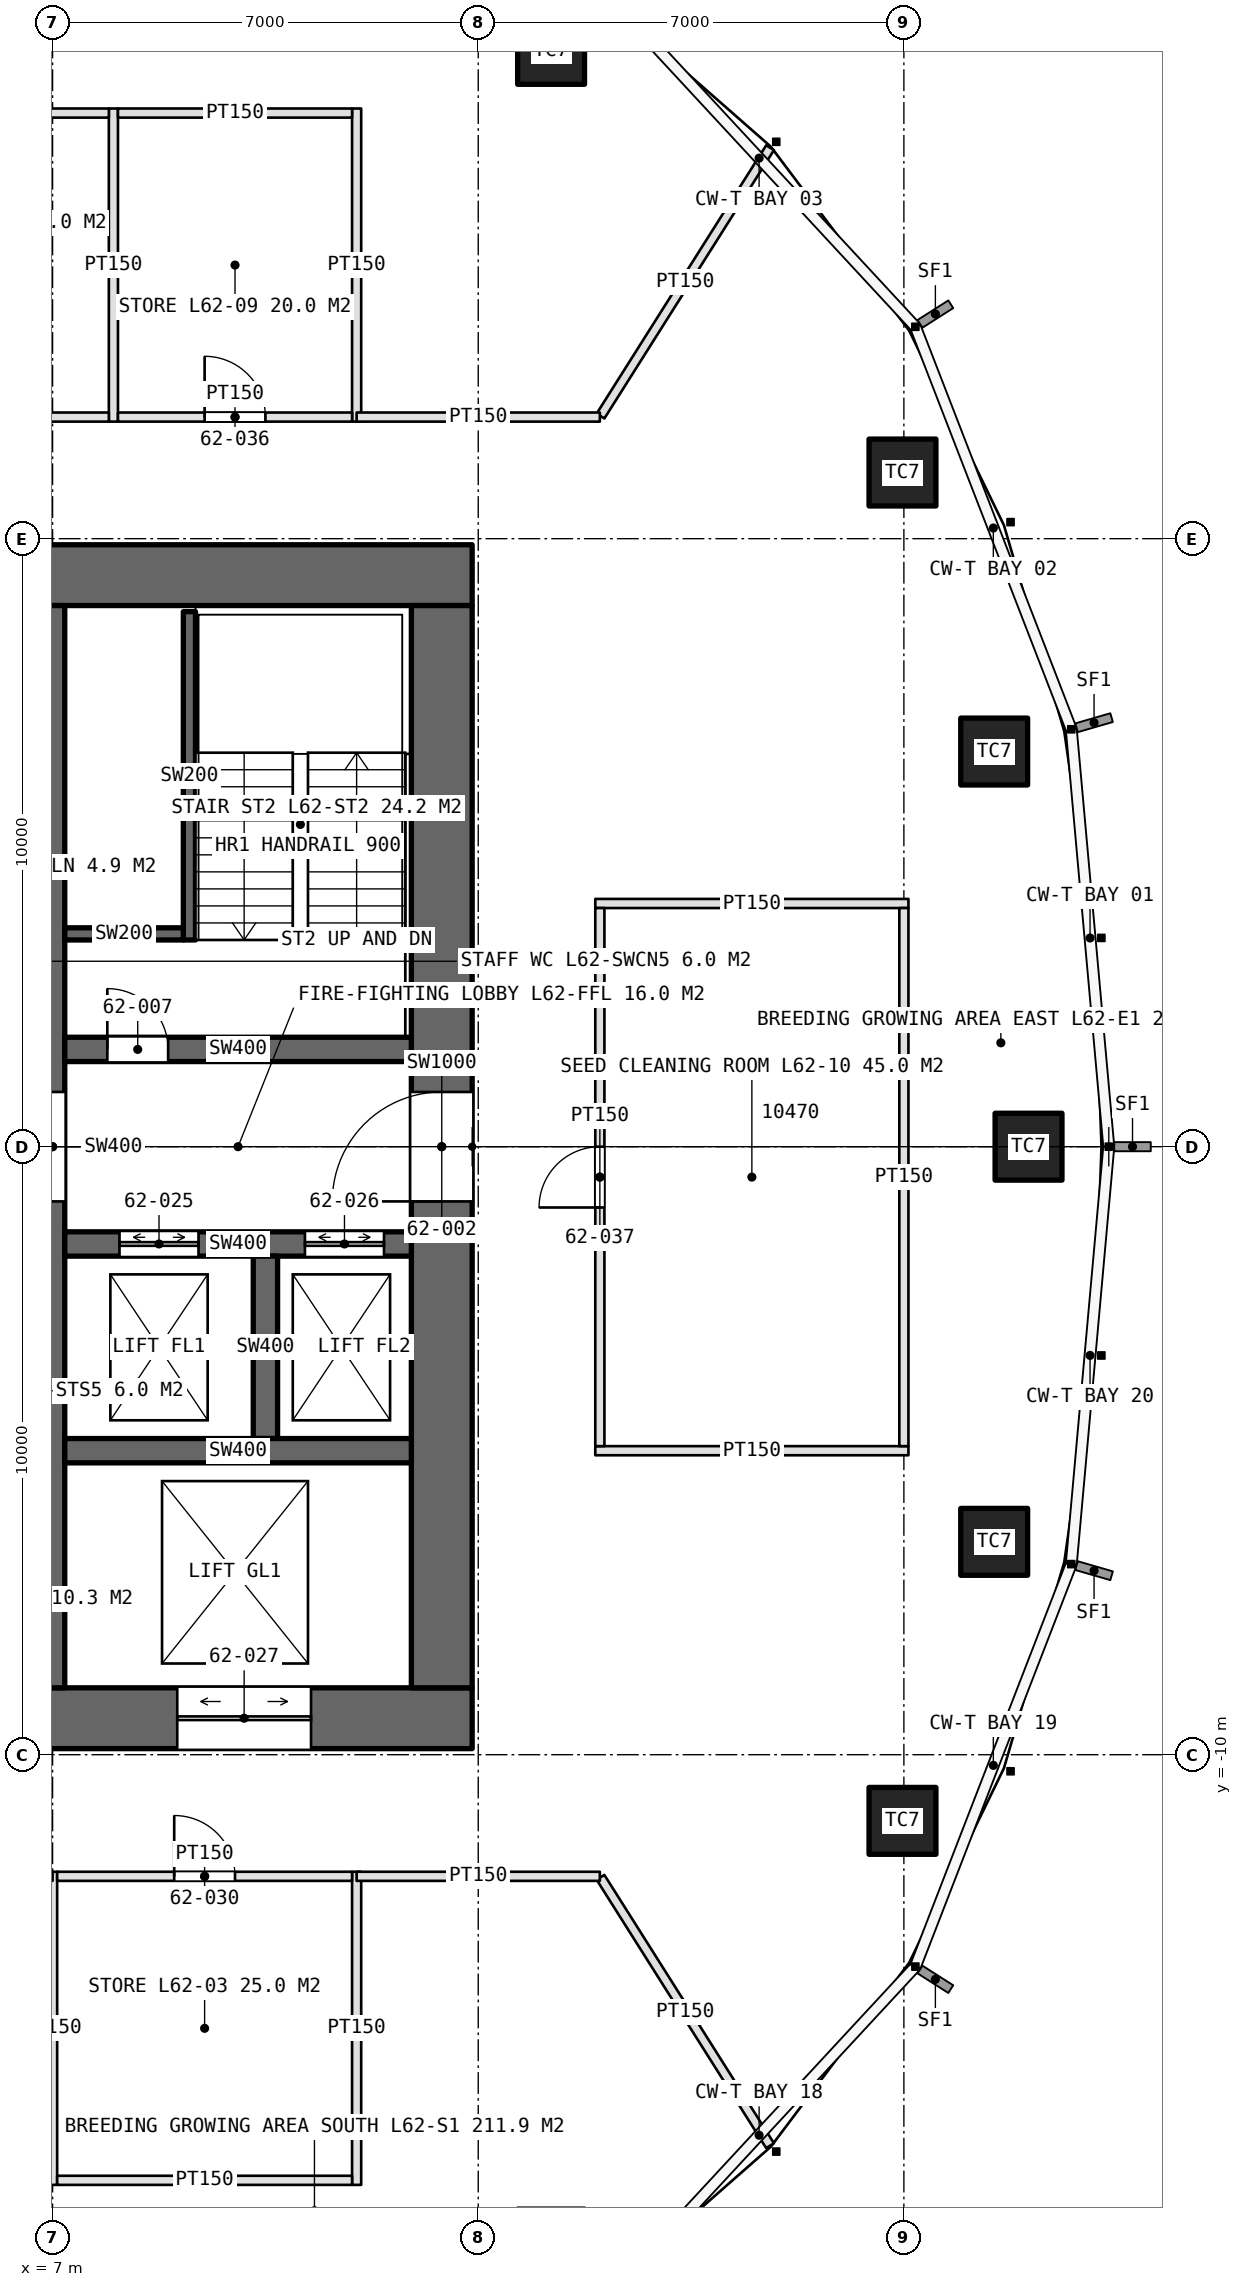
"""IFC4 building model, lengths in metres.
Left out: names, types, materials, properties, quantities, classifications, styles, units other than length and angle.
Written with IfcOpenShell. Run it as: python <this file> out.ifc"""

import sys

from ifc_helpers import new_model, si_unit, direction, frame, frame_2d, origin, origin_2d, place, context, subcontext, project, spatial, rectangle, extrude, element, fill, save


model = new_model("IFC4")
c1 = context("Model", 3, precision=1e-05, world=origin(), true_north=direction((0.0, 1.0)))
c2 = subcontext(c1, "Body", "Model", "MODEL_VIEW")
j1 = project(units=[si_unit("LENGTHUNIT", "METRE"), si_unit("PLANEANGLEUNIT", "RADIAN")], contexts=[c1])
p1 = place(None, origin())
s1 = spatial("IfcSite", under=j1, at=p1, CompositionType="ELEMENT")
p2 = place(p1, origin())
s2 = spatial("IfcBuilding", under=s1, at=p2, CompositionType="ELEMENT")
p3 = place(p2, frame((0.0, 0.0, 279.6)))
s3 = spatial("IfcBuildingStorey", under=s2, at=p3, CompositionType="ELEMENT", Elevation=279.6)
p4 = place(p3, frame((-13.9, -9.4, 0.0), z_axis=(0.0, 0.0, 1.0), x_axis=(1.0, 0.0, 0.0)))
e1 = element("IfcWall", 1, at=p4, inside=s3, PredefinedType="SHEAR", context=c2, shape_type="SweptSolid", body=[
    extrude(rectangle(XDim=27.8, YDim=1.0, at=frame_2d((13.9, 0.0))), origin(), (0.0, 0.0, 1.0), 4.2),
])
p5 = place(p4, frame((22.95, 0.0, 0.0)))
e2 = element("IfcOpeningElement", 2, at=p5, cuts=e1, PredefinedType="OPENING", context=c2, shape_type="SweptSolid", body=[
    extrude(rectangle(XDim=2.2, YDim=2.7, at=frame_2d((1.1, 1.35))), frame((0.0, 0.51, 0.0), z_axis=(0.0, -1.0, 0.0), x_axis=(1.0, 0.0, 0.0)), (0.0, 0.0, 1.0), 1.02),
])
p6 = place(p3, frame((13.9, 9.4, 0.0), z_axis=(0.0, 0.0, 1.0), x_axis=(-1.0, 0.0, 0.0)))
e3 = element("IfcWall", 3, at=p6, inside=s3, PredefinedType="SHEAR", context=c2, shape_type="SweptSolid", body=[
    extrude(rectangle(XDim=27.8, YDim=1.0, at=frame_2d((13.9, 0.0))), origin(), (0.0, 0.0, 1.0), 4.2),
])
p7 = place(p6, frame((23.9, 0.0, 0.0)))
e4 = element("IfcOpeningElement", 4, at=p7, cuts=e3, PredefinedType="OPENING", context=c2, shape_type="SweptSolid", body=[
    extrude(rectangle(XDim=1.0, YDim=2.4, at=frame_2d((0.5, 1.2))), frame((0.0, 0.51, 0.0), z_axis=(0.0, -1.0, 0.0), x_axis=(1.0, 0.0, 0.0)), (0.0, 0.0, 1.0), 1.02),
])
p8 = place(p6, frame((13.0, 0.0, 0.0)))
e5 = element("IfcOpeningElement", 5, at=p8, cuts=e3, PredefinedType="OPENING", context=c2, shape_type="SweptSolid", body=[
    extrude(rectangle(XDim=1.8, YDim=2.4, at=frame_2d((0.9, 1.2))), frame((0.0, 0.51, 0.0), z_axis=(0.0, -1.0, 0.0), x_axis=(1.0, 0.0, 0.0)), (0.0, 0.0, 1.0), 1.02),
])
p9 = place(p3, frame((13.4, -8.9, 0.0), z_axis=(0.0, 0.0, 1.0), x_axis=(0.0, 1.0, 0.0)))
e6 = element("IfcWall", 6, at=p9, inside=s3, PredefinedType="SHEAR", context=c2, shape_type="SweptSolid", body=[
    extrude(rectangle(XDim=17.8, YDim=1.0, at=frame_2d((8.9, 0.0))), origin(), (0.0, 0.0, 1.0), 4.2),
])
p10 = place(p9, frame((8.0, 0.0, 0.0)))
e7 = element("IfcOpeningElement", 7, at=p10, cuts=e6, PredefinedType="OPENING", context=c2, shape_type="SweptSolid", body=[
    extrude(rectangle(XDim=1.8, YDim=2.4, at=frame_2d((0.9, 1.2))), frame((0.0, 0.51, 0.0), z_axis=(0.0, -1.0, 0.0), x_axis=(1.0, 0.0, 0.0)), (0.0, 0.0, 1.0), 1.02),
])
p11 = place(p3, frame((7.0, -8.9, 0.0), z_axis=(0.0, 0.0, 1.0), x_axis=(0.0, 1.0, 0.0)))
e8 = element("IfcWall", 8, at=p11, inside=s3, PredefinedType="SHEAR", context=c2, shape_type="SweptSolid", body=[
    extrude(rectangle(XDim=17.8, YDim=0.4, at=frame_2d((8.9, 0.0))), origin(), (0.0, 0.0, 1.0), 4.2),
])
p12 = place(p11, frame((8.0, 0.0, 0.0)))
e9 = element("IfcOpeningElement", 9, at=p12, cuts=e8, PredefinedType="OPENING", context=c2, shape_type="SweptSolid", body=[
    extrude(rectangle(XDim=1.8, YDim=2.4, at=frame_2d((0.9, 1.2))), frame((0.0, 0.21, 0.0), z_axis=(0.0, -1.0, 0.0), x_axis=(1.0, 0.0, 0.0)), (0.0, 0.0, 1.0), 0.42),
])
p13 = place(p3, frame((7.2, 1.6, 0.0), z_axis=(0.0, 0.0, 1.0), x_axis=(1.0, 0.0, 0.0)))
e10 = element("IfcWall", 10, at=p13, inside=s3, PredefinedType="SHEAR", context=c2, shape_type="SweptSolid", body=[
    extrude(rectangle(XDim=5.7, YDim=0.4, at=frame_2d((2.85, 0.0))), origin(), (0.0, 0.0, 1.0), 4.2),
])
p14 = place(p13, frame((0.7, 0.0, 0.0)))
e11 = element("IfcOpeningElement", 11, at=p14, cuts=e10, PredefinedType="OPENING", context=c2, shape_type="SweptSolid", body=[
    extrude(rectangle(XDim=1.0, YDim=2.4, at=frame_2d((0.5, 1.2))), frame((0.0, 0.21, 0.0), z_axis=(0.0, -1.0, 0.0), x_axis=(1.0, 0.0, 0.0)), (0.0, 0.0, 1.0), 0.42),
])
p15 = place(p3, frame((7.2, -1.6, 0.0), z_axis=(0.0, 0.0, 1.0), x_axis=(1.0, 0.0, 0.0)))
e12 = element("IfcWall", 12, at=p15, inside=s3, PredefinedType="SHEAR", context=c2, shape_type="SweptSolid", body=[
    extrude(rectangle(XDim=5.7, YDim=0.4, at=frame_2d((2.85, 0.0))), origin(), (0.0, 0.0, 1.0), 4.2),
])
p16 = place(p15, frame((0.9, 0.0, 0.0)))
e13 = element("IfcOpeningElement", 13, at=p16, cuts=e12, PredefinedType="OPENING", context=c2, shape_type="SweptSolid", body=[
    extrude(rectangle(XDim=1.3, YDim=2.4, at=frame_2d((0.65, 1.2))), frame((0.0, 0.21, 0.0), z_axis=(0.0, -1.0, 0.0), x_axis=(1.0, 0.0, 0.0)), (0.0, 0.0, 1.0), 0.42),
])
p17 = place(p15, frame((3.95, 0.0, 0.0)))
e14 = element("IfcOpeningElement", 14, at=p17, cuts=e12, PredefinedType="OPENING", context=c2, shape_type="SweptSolid", body=[
    extrude(rectangle(XDim=1.3, YDim=2.4, at=frame_2d((0.65, 1.2))), frame((0.0, 0.21, 0.0), z_axis=(0.0, -1.0, 0.0), x_axis=(1.0, 0.0, 0.0)), (0.0, 0.0, 1.0), 0.42),
])
p18 = place(p3, frame((10.5, -4.8, 0.0), z_axis=(0.0, 0.0, 1.0), x_axis=(0.0, 1.0, 0.0)))
e15 = element("IfcWall", 15, at=p18, inside=s3, PredefinedType="SHEAR", context=c2, shape_type="SweptSolid", body=[
    extrude(rectangle(XDim=3.0, YDim=0.4, at=frame_2d((1.5, 0.0))), origin(), (0.0, 0.0, 1.0), 4.2),
])
p19 = place(p3, frame((7.2, -5.0, 0.0), z_axis=(0.0, 0.0, 1.0), x_axis=(1.0, 0.0, 0.0)))
e16 = element("IfcWall", 16, at=p19, inside=s3, PredefinedType="SHEAR", context=c2, shape_type="SweptSolid", body=[
    extrude(rectangle(XDim=5.7, YDim=0.4, at=frame_2d((2.85, 0.0))), origin(), (0.0, 0.0, 1.0), 4.2),
])
for number, where, z_axis, x_axis in (
    (17, (23.05, 0.0, 0.0), (0.0, 0.0, 1.0), (1.0, 0.0, 0.0)),
    (18, (22.485, 6.499, 0.0), (0.0, 0.0, 1.0), (1.0, 0.0, 0.0)),
    (19, (20.977, 11.088, 0.0), (0.0, 0.0, 1.0), (1.0, 0.0, 0.0)),
    (20, (15.198, 18.023, 0.0), (0.0, 0.0, 1.0), (1.0, 0.0, 0.0)),
    (21, (20.977, -11.088, 0.0), (0.0, 0.0, 1.0), (1.0, 0.0, 0.0)),
    (22, (22.485, -6.499, 0.0), (0.0, 0.0, 1.0), (1.0, 0.0, 0.0)),
):
    element("IfcColumn", number, at=place(p3, frame(where, z_axis=z_axis, x_axis=x_axis)), inside=s3, PredefinedType="COLUMN", context=c2, shape_type="SweptSolid", body=[
        extrude(rectangle(XDim=1.1, YDim=1.1, at=origin_2d()), origin(), (0.0, 0.0, 1.0), 4.2),
    ])
p20 = place(p3, frame((9.25, 3.4, 0.0), z_axis=(0.0, 0.0, 1.0), x_axis=(0.0, 1.0, 0.0)))
e23 = element("IfcWall", 23, at=p20, inside=s3, PredefinedType="SOLIDWALL", context=c2, shape_type="SweptSolid", body=[
    extrude(rectangle(XDim=5.4, YDim=0.2, at=frame_2d((2.7, 0.0))), origin(), (0.0, 0.0, 1.0), 4.2),
])
p21 = place(p3, frame((9.15, 3.5, 0.0), z_axis=(0.0, 0.0, 1.0), x_axis=(-1.0, 0.0, 0.0)))
e24 = element("IfcWall", 24, at=p21, inside=s3, PredefinedType="SOLIDWALL", context=c2, shape_type="SweptSolid", body=[
    extrude(rectangle(XDim=1.95, YDim=0.2, at=frame_2d((0.975, 0.0))), origin(), (0.0, 0.0, 1.0), 4.2),
])
for number, where, z_axis, x_axis in (
    (25, (7.0, -11.925, 0.0), (0.0, 0.0, 1.0), (0.0, -1.0, 0.0)),
    (26, (12.0, -11.925, 0.0), (0.0, 0.0, 1.0), (0.0, -1.0, 0.0)),
):
    element("IfcWall", number, at=place(p3, frame(where, z_axis=z_axis, x_axis=x_axis)), inside=s3, PredefinedType="PARTITIONING", context=c2, shape_type="SweptSolid", body=[
        extrude(rectangle(XDim=5.15, YDim=0.15, at=frame_2d((2.575, 0.0))), origin(), (0.0, 0.0, 1.0), 3.0),
    ])
p22 = place(p3, frame((7.075, -12.0, 0.0), z_axis=(0.0, 0.0, 1.0), x_axis=(1.0, 0.0, 0.0)))
e27 = element("IfcWall", 27, at=p22, inside=s3, PredefinedType="PARTITIONING", context=c2, shape_type="SweptSolid", body=[
    extrude(rectangle(XDim=4.85, YDim=0.15, at=frame_2d((2.425, 0.0))), origin(), (0.0, 0.0, 1.0), 3.0),
])
p23 = place(p22, frame((1.925, 0.0, 0.0)))
e28 = element("IfcOpeningElement", 28, at=p23, cuts=e27, PredefinedType="OPENING", context=c2, shape_type="SweptSolid", body=[
    extrude(rectangle(XDim=1.0, YDim=2.2, at=frame_2d((0.5, 1.1))), frame((0.0, 0.085, 0.0), z_axis=(0.0, -1.0, 0.0), x_axis=(1.0, 0.0, 0.0)), (0.0, 0.0, 1.0), 0.17),
])
p24 = place(p3, frame((7.075, -17.0, 0.0), z_axis=(0.0, 0.0, 1.0), x_axis=(1.0, 0.0, 0.0)))
e29 = element("IfcWall", 29, at=p24, inside=s3, PredefinedType="PARTITIONING", context=c2, shape_type="SweptSolid", body=[
    extrude(rectangle(XDim=4.85, YDim=0.15, at=frame_2d((2.425, 0.0))), origin(), (0.0, 0.0, 1.0), 3.0),
])
for number, where, z_axis, x_axis in (
    (30, (8.0, 11.925, 0.0), (0.0, 0.0, 1.0), (0.0, 1.0, 0.0)),
    (31, (12.0, 11.925, 0.0), (0.0, 0.0, 1.0), (0.0, 1.0, 0.0)),
):
    element("IfcWall", number, at=place(p3, frame(where, z_axis=z_axis, x_axis=x_axis)), inside=s3, PredefinedType="PARTITIONING", context=c2, shape_type="SweptSolid", body=[
        extrude(rectangle(XDim=5.15, YDim=0.15, at=frame_2d((2.575, 0.0))), origin(), (0.0, 0.0, 1.0), 3.0),
    ])
p25 = place(p3, frame((3.075, 12.0, 0.0), z_axis=(0.0, 0.0, 1.0), x_axis=(1.0, 0.0, 0.0)))
e32 = element("IfcWall", 32, at=p25, inside=s3, PredefinedType="PARTITIONING", context=c2, shape_type="SweptSolid", body=[
    extrude(rectangle(XDim=4.85, YDim=0.15, at=frame_2d((2.425, 0.0))), origin(), (0.0, 0.0, 1.0), 3.0),
])
p26 = place(p25, frame((1.925, 0.0, 0.0)))
e33 = element("IfcOpeningElement", 33, at=p26, cuts=e32, PredefinedType="OPENING", context=c2, shape_type="SweptSolid", body=[
    extrude(rectangle(XDim=1.0, YDim=2.2, at=frame_2d((0.5, 1.1))), frame((0.0, 0.085, 0.0), z_axis=(0.0, -1.0, 0.0), x_axis=(1.0, 0.0, 0.0)), (0.0, 0.0, 1.0), 0.17),
])
p27 = place(p3, frame((3.075, 17.0, 0.0), z_axis=(0.0, 0.0, 1.0), x_axis=(1.0, 0.0, 0.0)))
e34 = element("IfcWall", 34, at=p27, inside=s3, PredefinedType="PARTITIONING", context=c2, shape_type="SweptSolid", body=[
    extrude(rectangle(XDim=4.85, YDim=0.15, at=frame_2d((2.425, 0.0))), origin(), (0.0, 0.0, 1.0), 3.0),
])
p28 = place(p3, frame((8.075, 12.0, 0.0), z_axis=(0.0, 0.0, 1.0), x_axis=(1.0, 0.0, 0.0)))
e35 = element("IfcWall", 35, at=p28, inside=s3, PredefinedType="PARTITIONING", context=c2, shape_type="SweptSolid", body=[
    extrude(rectangle(XDim=3.85, YDim=0.15, at=frame_2d((1.925, 0.0))), origin(), (0.0, 0.0, 1.0), 3.0),
])
p29 = place(p28, frame((1.425, 0.0, 0.0)))
e36 = element("IfcOpeningElement", 36, at=p29, cuts=e35, PredefinedType="OPENING", context=c2, shape_type="SweptSolid", body=[
    extrude(rectangle(XDim=1.0, YDim=2.2, at=frame_2d((0.5, 1.1))), frame((0.0, 0.085, 0.0), z_axis=(0.0, -1.0, 0.0), x_axis=(1.0, 0.0, 0.0)), (0.0, 0.0, 1.0), 0.17),
])
p30 = place(p3, frame((8.075, 17.0, 0.0), z_axis=(0.0, 0.0, 1.0), x_axis=(1.0, 0.0, 0.0)))
e37 = element("IfcWall", 37, at=p30, inside=s3, PredefinedType="PARTITIONING", context=c2, shape_type="SweptSolid", body=[
    extrude(rectangle(XDim=3.85, YDim=0.15, at=frame_2d((1.925, 0.0))), origin(), (0.0, 0.0, 1.0), 3.0),
])
for number, where, z_axis, x_axis in (
    (38, (15.925, -5.0, 0.0), (0.0, 0.0, 1.0), (1.0, 0.0, 0.0)),
    (39, (15.925, 4.0, 0.0), (0.0, 0.0, 1.0), (1.0, 0.0, 0.0)),
):
    element("IfcWall", number, at=place(p3, frame(where, z_axis=z_axis, x_axis=x_axis)), inside=s3, PredefinedType="PARTITIONING", context=c2, shape_type="SweptSolid", body=[
        extrude(rectangle(XDim=5.15, YDim=0.15, at=frame_2d((2.575, 0.0))), origin(), (0.0, 0.0, 1.0), 3.0),
    ])
p31 = place(p3, frame((16.0, -4.925, 0.0), z_axis=(0.0, 0.0, 1.0), x_axis=(0.0, 1.0, 0.0)))
e40 = element("IfcWall", 40, at=p31, inside=s3, PredefinedType="PARTITIONING", context=c2, shape_type="SweptSolid", body=[
    extrude(rectangle(XDim=8.85, YDim=0.15, at=frame_2d((4.425, 0.0))), origin(), (0.0, 0.0, 1.0), 3.0),
])
p32 = place(p31, frame((3.925, 0.0, 0.0)))
e41 = element("IfcOpeningElement", 41, at=p32, cuts=e40, PredefinedType="OPENING", context=c2, shape_type="SweptSolid", body=[
    extrude(rectangle(XDim=1.0, YDim=2.2, at=frame_2d((0.5, 1.1))), frame((0.0, 0.085, 0.0), z_axis=(0.0, -1.0, 0.0), x_axis=(1.0, 0.0, 0.0)), (0.0, 0.0, 1.0), 0.17),
])
p33 = place(p3, frame((21.0, -4.925, 0.0), z_axis=(0.0, 0.0, 1.0), x_axis=(0.0, 1.0, 0.0)))
e42 = element("IfcWall", 42, at=p33, inside=s3, PredefinedType="PARTITIONING", context=c2, shape_type="SweptSolid", body=[
    extrude(rectangle(XDim=8.85, YDim=0.15, at=frame_2d((4.425, 0.0))), origin(), (0.0, 0.0, 1.0), 3.0),
])
for number, where, z_axis, x_axis in (
    (43, (16.011, -12.017, 0.0), (0.0, 0.0, 1.0), (0.534, -0.845, 0.0)),
    (44, (16.011, 12.017, 0.0), (0.0, 0.0, 1.0), (0.534, 0.845, 0.0)),
):
    element("IfcWall", number, at=place(p3, frame(where, z_axis=z_axis, x_axis=x_axis)), inside=s3, PredefinedType="PARTITIONING", context=c2, shape_type="SweptSolid", body=[
        extrude(rectangle(XDim=5.22, YDim=0.15, at=frame_2d((2.61, 0.0))), origin(), (0.0, 0.0, 1.0), 3.0),
    ])
for number, where, z_axis, x_axis in (
    (45, (16.0, 12.0, 0.0), (0.0, 0.0, 1.0), (-1.0, 0.0, 0.0)),
    (46, (12.0, -12.0, 0.0), (0.0, 0.0, 1.0), (1.0, 0.0, 0.0)),
):
    element("IfcWall", number, at=place(p3, frame(where, z_axis=z_axis, x_axis=x_axis)), inside=s3, PredefinedType="PARTITIONING", context=c2, shape_type="SweptSolid", body=[
        extrude(rectangle(XDim=4.0, YDim=0.15, at=frame_2d((2.0, 0.0))), origin(), (0.0, 0.0, 1.0), 3.0),
    ])
p34 = place(p10, origin())
e47 = element("IfcDoor", 47, at=p34, inside=s3, OperationType="DOUBLE_DOOR_SINGLE_SWING", PredefinedType="DOOR", context=c2, shape_type="SweptSolid", body=[
    extrude(rectangle(XDim=1.8, YDim=2.4, at=frame_2d((0.9, 1.2))), frame((0.0, 0.025, 0.0), z_axis=(0.0, -1.0, 0.0), x_axis=(1.0, 0.0, 0.0)), (0.0, 0.0, 1.0), 0.05),
])
fill(e7, e47)
p35 = place(p12, origin())
e48 = element("IfcDoor", 48, at=p35, inside=s3, OperationType="DOUBLE_DOOR_SINGLE_SWING", PredefinedType="DOOR", context=c2, shape_type="SweptSolid", body=[
    extrude(rectangle(XDim=1.8, YDim=2.4, at=frame_2d((0.9, 1.2))), frame((0.0, 0.025, 0.0), z_axis=(0.0, -1.0, 0.0), x_axis=(1.0, 0.0, 0.0)), (0.0, 0.0, 1.0), 0.05),
])
fill(e9, e48)
p36 = place(p14, origin())
e49 = element("IfcDoor", 49, at=p36, inside=s3, OperationType="SINGLE_SWING_LEFT", PredefinedType="DOOR", context=c2, shape_type="SweptSolid", body=[
    extrude(rectangle(XDim=1.0, YDim=2.4, at=frame_2d((0.5, 1.2))), frame((0.0, 0.025, 0.0), z_axis=(0.0, -1.0, 0.0), x_axis=(1.0, 0.0, 0.0)), (0.0, 0.0, 1.0), 0.05),
])
fill(e11, e49)
p37 = place(p16, origin())
e50 = element("IfcDoor", 50, at=p37, inside=s3, OperationType="DOUBLE_DOOR_SLIDING", PredefinedType="DOOR", context=c2, shape_type="SweptSolid", body=[
    extrude(rectangle(XDim=1.3, YDim=2.4, at=frame_2d((0.65, 1.2))), frame((0.0, 0.025, 0.0), z_axis=(0.0, -1.0, 0.0), x_axis=(1.0, 0.0, 0.0)), (0.0, 0.0, 1.0), 0.05),
])
fill(e13, e50)
p38 = place(p17, origin())
e51 = element("IfcDoor", 51, at=p38, inside=s3, OperationType="DOUBLE_DOOR_SLIDING", PredefinedType="DOOR", context=c2, shape_type="SweptSolid", body=[
    extrude(rectangle(XDim=1.3, YDim=2.4, at=frame_2d((0.65, 1.2))), frame((0.0, 0.025, 0.0), z_axis=(0.0, -1.0, 0.0), x_axis=(1.0, 0.0, 0.0)), (0.0, 0.0, 1.0), 0.05),
])
fill(e14, e51)
p39 = place(p5, origin())
e52 = element("IfcDoor", 52, at=p39, inside=s3, OperationType="DOUBLE_DOOR_SLIDING", PredefinedType="DOOR", context=c2, shape_type="SweptSolid", body=[
    extrude(rectangle(XDim=2.2, YDim=2.7, at=frame_2d((1.1, 1.35))), frame((0.0, 0.025, 0.0), z_axis=(0.0, -1.0, 0.0), x_axis=(1.0, 0.0, 0.0)), (0.0, 0.0, 1.0), 0.05),
])
fill(e2, e52)
p40 = place(p23, origin())
e53 = element("IfcDoor", 53, at=p40, inside=s3, OperationType="SINGLE_SWING_LEFT", PredefinedType="DOOR", context=c2, shape_type="SweptSolid", body=[
    extrude(rectangle(XDim=1.0, YDim=2.2, at=frame_2d((0.5, 1.1))), frame((0.0, 0.025, 0.0), z_axis=(0.0, -1.0, 0.0), x_axis=(1.0, 0.0, 0.0)), (0.0, 0.0, 1.0), 0.05),
])
fill(e28, e53)
p41 = place(p29, origin())
e54 = element("IfcDoor", 54, at=p41, inside=s3, OperationType="SINGLE_SWING_LEFT", PredefinedType="DOOR", context=c2, shape_type="SweptSolid", body=[
    extrude(rectangle(XDim=1.0, YDim=2.2, at=frame_2d((0.5, 1.1))), frame((0.0, 0.025, 0.0), z_axis=(0.0, -1.0, 0.0), x_axis=(1.0, 0.0, 0.0)), (0.0, 0.0, 1.0), 0.05),
])
fill(e36, e54)
p42 = place(p32, origin())
e55 = element("IfcDoor", 55, at=p42, inside=s3, OperationType="SINGLE_SWING_LEFT", PredefinedType="DOOR", context=c2, shape_type="SweptSolid", body=[
    extrude(rectangle(XDim=1.0, YDim=2.2, at=frame_2d((0.5, 1.1))), frame((0.0, 0.025, 0.0), z_axis=(0.0, -1.0, 0.0), x_axis=(1.0, 0.0, 0.0)), (0.0, 0.0, 1.0), 0.05),
])
fill(e41, e55)
save(model, sys.argv[1])
